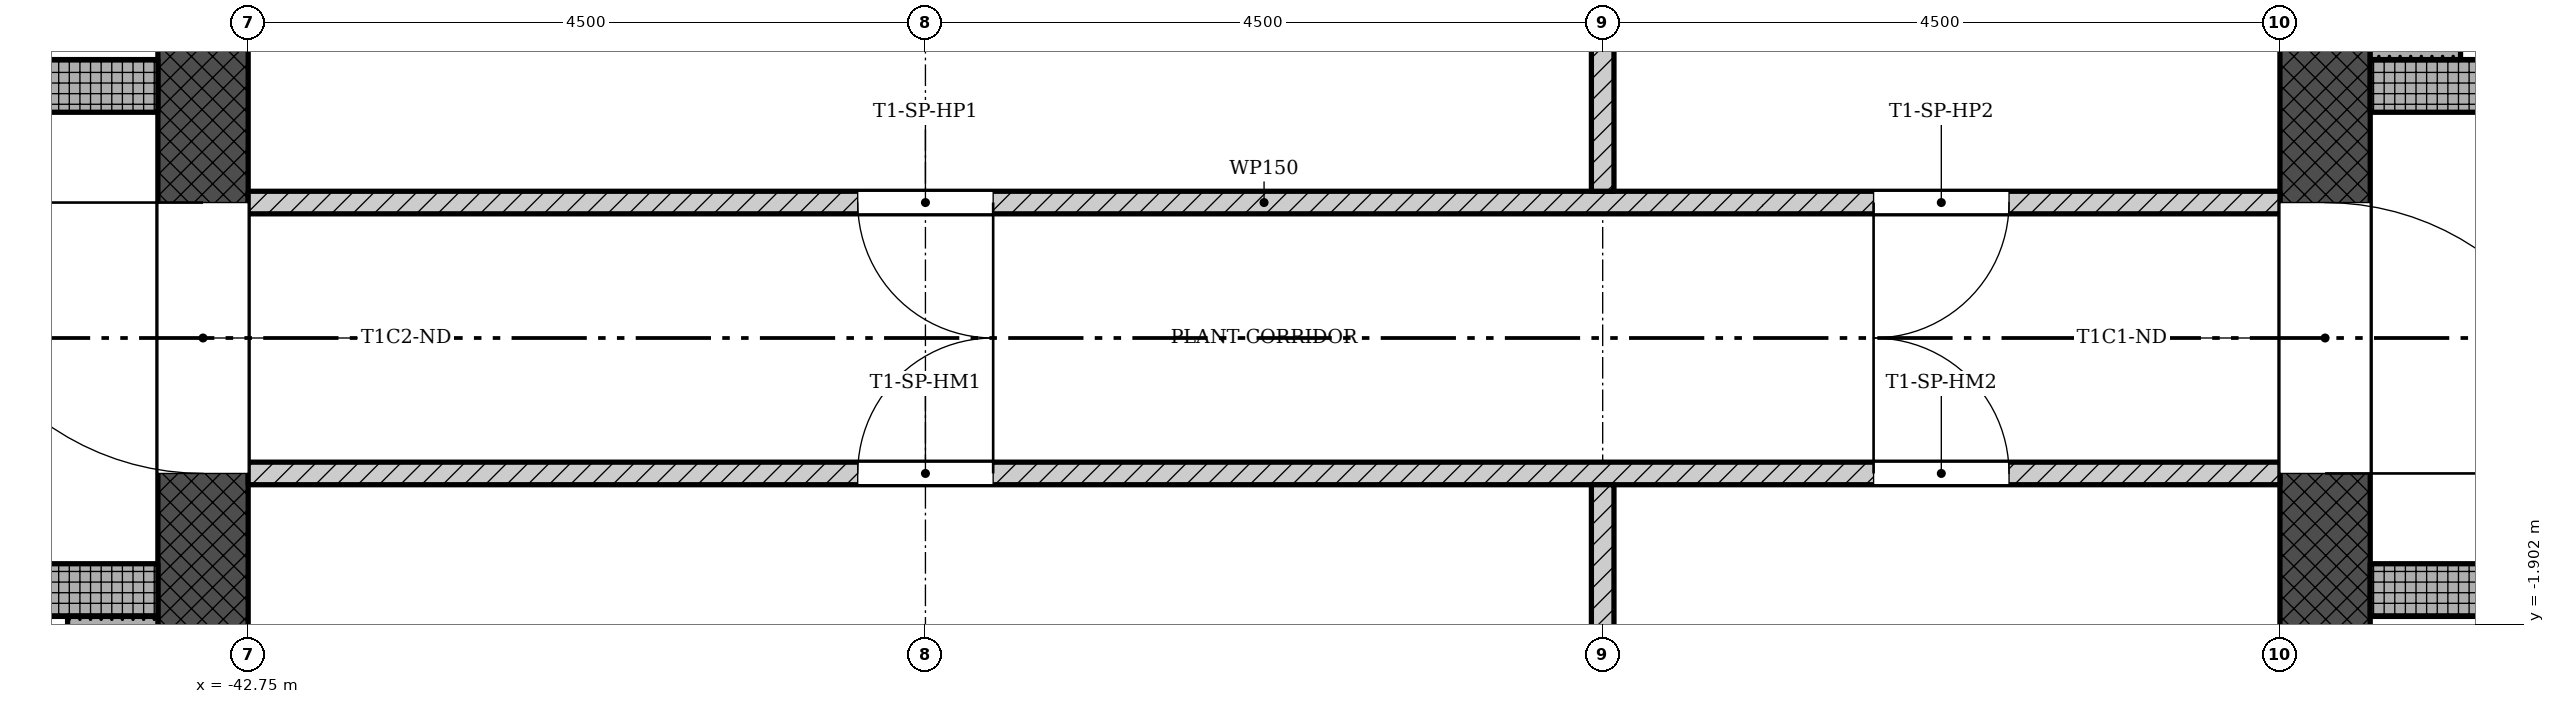
"""IFC4 building model, lengths in metres.
Left out: names, types, materials, properties, quantities, classifications, styles, units other than length and angle.
Written with IfcOpenShell. Run it as: python <this file> out.ifc"""

import sys

from ifc_helpers import new_model, si_unit, direction, frame, frame_2d, origin, place, context, subcontext, project, spatial, rectangle, extrude, element, fill, save


model = new_model("IFC4")
c1 = context("Model", 3, precision=1e-05, world=origin(), true_north=direction((0.0, 1.0)))
c2 = subcontext(c1, "Body", "Model", "MODEL_VIEW")
j1 = project(units=[si_unit("LENGTHUNIT", "METRE"), si_unit("PLANEANGLEUNIT", "RADIAN")], contexts=[c1])
p1 = place(None, origin())
s1 = spatial("IfcSite", under=j1, at=p1, CompositionType="ELEMENT")
p2 = place(p1, origin())
s2 = spatial("IfcBuilding", under=s1, at=p2, CompositionType="ELEMENT")
p3 = place(p2, frame((0.0, 0.0, 251.4)))
s3 = spatial("IfcBuildingStorey", under=s2, at=p3, CompositionType="ELEMENT", Elevation=251.4)
p4 = place(p3, frame((-28.95, 6.15, 0.0), z_axis=(0.0, 0.0, 1.0), x_axis=(0.0, -1.0, 0.0)))
e1 = element("IfcWall", 1, at=p4, inside=s3, PredefinedType="SHEAR", context=c2, shape_type="SweptSolid", body=[
    extrude(rectangle(XDim=12.9, YDim=0.6, at=frame_2d((6.45, 0.0))), origin(), (0.0, 0.0, 1.0), 4.5),
])
p5 = place(p4, frame((5.25, 0.0, 0.0)))
e2 = element("IfcOpeningElement", 2, at=p5, cuts=e1, PredefinedType="OPENING", context=c2, shape_type="SweptSolid", body=[
    extrude(rectangle(XDim=1.8, YDim=2.1, at=frame_2d((0.9, 1.05))), frame((0.0, 0.31, 0.0), z_axis=(0.0, -1.0, 0.0), x_axis=(1.0, 0.0, 0.0)), (0.0, 0.0, 1.0), 0.62),
])
p6 = place(p3, frame((-28.65, -1.675, 0.0), z_axis=(0.0, 0.0, 1.0), x_axis=(1.0, 0.0, 0.0)))
e3 = element("IfcWall", 3, at=p6, inside=s3, PredefinedType="SHEAR", context=c2, shape_type="SweptSolid", body=[
    extrude(rectangle(XDim=7.8, YDim=0.35, at=frame_2d((3.9, 0.0))), origin(), (0.0, 0.0, 1.0), 4.5),
])
p7 = place(p3, frame((-28.65, 1.675, 0.0), z_axis=(0.0, 0.0, 1.0), x_axis=(1.0, 0.0, 0.0)))
e4 = element("IfcWall", 4, at=p7, inside=s3, PredefinedType="SHEAR", context=c2, shape_type="SweptSolid", body=[
    extrude(rectangle(XDim=7.8, YDim=0.35, at=frame_2d((3.9, 0.0))), origin(), (0.0, 0.0, 1.0), 4.5),
])
p8 = place(p7, frame((1.05, 0.0, 0.0)))
e5 = element("IfcOpeningElement", 5, at=p8, cuts=e4, PredefinedType="OPENING", context=c2, shape_type="SweptSolid", body=[
    extrude(rectangle(XDim=0.9, YDim=2.1, at=frame_2d((0.45, 1.05))), frame((0.0, 0.185, 0.0), z_axis=(0.0, -1.0, 0.0), x_axis=(1.0, 0.0, 0.0)), (0.0, 0.0, 1.0), 0.37),
])
p9 = place(p3, frame((-43.05, -6.15, 0.0), z_axis=(0.0, 0.0, 1.0), x_axis=(0.0, 1.0, 0.0)))
e6 = element("IfcWall", 6, at=p9, inside=s3, PredefinedType="SHEAR", context=c2, shape_type="SweptSolid", body=[
    extrude(rectangle(XDim=12.9, YDim=0.6, at=frame_2d((6.45, 0.0))), origin(), (0.0, 0.0, 1.0), 4.5),
])
p10 = place(p9, frame((5.25, 0.0, 0.0)))
e7 = element("IfcOpeningElement", 7, at=p10, cuts=e6, PredefinedType="OPENING", context=c2, shape_type="SweptSolid", body=[
    extrude(rectangle(XDim=1.8, YDim=2.1, at=frame_2d((0.9, 1.05))), frame((0.0, 0.31, 0.0), z_axis=(0.0, -1.0, 0.0), x_axis=(1.0, 0.0, 0.0)), (0.0, 0.0, 1.0), 0.62),
])
p11 = place(p3, frame((-51.15, -1.675, 0.0), z_axis=(0.0, 0.0, 1.0), x_axis=(1.0, 0.0, 0.0)))
e8 = element("IfcWall", 8, at=p11, inside=s3, PredefinedType="SHEAR", context=c2, shape_type="SweptSolid", body=[
    extrude(rectangle(XDim=7.8, YDim=0.35, at=frame_2d((3.9, 0.0))), origin(), (0.0, 0.0, 1.0), 4.5),
])
p12 = place(p11, frame((5.85, 0.0, 0.0)))
e9 = element("IfcOpeningElement", 9, at=p12, cuts=e8, PredefinedType="OPENING", context=c2, shape_type="SweptSolid", body=[
    extrude(rectangle(XDim=0.9, YDim=2.1, at=frame_2d((0.45, 1.05))), frame((0.0, 0.185, 0.0), z_axis=(0.0, -1.0, 0.0), x_axis=(1.0, 0.0, 0.0)), (0.0, 0.0, 1.0), 0.37),
])
p13 = place(p3, frame((-51.15, 1.675, 0.0), z_axis=(0.0, 0.0, 1.0), x_axis=(1.0, 0.0, 0.0)))
e10 = element("IfcWall", 10, at=p13, inside=s3, PredefinedType="SHEAR", context=c2, shape_type="SweptSolid", body=[
    extrude(rectangle(XDim=7.8, YDim=0.35, at=frame_2d((3.9, 0.0))), origin(), (0.0, 0.0, 1.0), 4.5),
])
p14 = place(p13, frame((5.55, 0.0, 0.0)))
e11 = element("IfcOpeningElement", 11, at=p14, cuts=e10, PredefinedType="OPENING", context=c2, shape_type="SweptSolid", body=[
    extrude(rectangle(XDim=1.1, YDim=2.1, at=frame_2d((0.55, 1.05))), frame((0.0, 0.185, 0.0), z_axis=(0.0, -1.0, 0.0), x_axis=(1.0, 0.0, 0.0)), (0.0, 0.0, 1.0), 0.37),
])
p15 = place(p13, frame((3.5, 0.0, 0.0)))
e12 = element("IfcOpeningElement", 12, at=p15, cuts=e10, PredefinedType="OPENING", context=c2, shape_type="SweptSolid", body=[
    extrude(rectangle(XDim=0.9, YDim=2.1, at=frame_2d((0.45, 1.05))), frame((0.0, 0.185, 0.0), z_axis=(0.0, -1.0, 0.0), x_axis=(1.0, 0.0, 0.0)), (0.0, 0.0, 1.0), 0.37),
])
p16 = place(p3, frame((-42.75, 0.9, 0.0), z_axis=(0.0, 0.0, 1.0), x_axis=(1.0, 0.0, 0.0)))
e13 = element("IfcWall", 13, at=p16, inside=s3, PredefinedType="PARTITIONING", context=c2, shape_type="SweptSolid", body=[
    extrude(rectangle(XDim=13.5, YDim=0.15, at=frame_2d((6.75, 0.0))), origin(), (0.0, 0.0, 1.0), 4.1),
])
p17 = place(p16, frame((4.05, 0.0, 0.0)))
e14 = element("IfcOpeningElement", 14, at=p17, cuts=e13, PredefinedType="OPENING", context=c2, shape_type="SweptSolid", body=[
    extrude(rectangle(XDim=0.9, YDim=2.1, at=frame_2d((0.45, 1.05))), frame((0.0, 0.085, 0.0), z_axis=(0.0, -1.0, 0.0), x_axis=(1.0, 0.0, 0.0)), (0.0, 0.0, 1.0), 0.17),
])
p18 = place(p16, frame((10.8, 0.0, 0.0)))
e15 = element("IfcOpeningElement", 15, at=p18, cuts=e13, PredefinedType="OPENING", context=c2, shape_type="SweptSolid", body=[
    extrude(rectangle(XDim=0.9, YDim=2.1, at=frame_2d((0.45, 1.05))), frame((0.0, 0.085, 0.0), z_axis=(0.0, -1.0, 0.0), x_axis=(1.0, 0.0, 0.0)), (0.0, 0.0, 1.0), 0.17),
])
p19 = place(p3, frame((-33.75, 0.975, 0.0), z_axis=(0.0, 0.0, 1.0), x_axis=(0.0, 1.0, 0.0)))
e16 = element("IfcWall", 16, at=p19, inside=s3, PredefinedType="PARTITIONING", context=c2, shape_type="SweptSolid", body=[
    extrude(rectangle(XDim=5.875, YDim=0.15, at=frame_2d((2.938, 0.0))), origin(), (0.0, 0.0, 1.0), 4.1),
])
p20 = place(p3, frame((-42.75, -0.9, 0.0), z_axis=(0.0, 0.0, 1.0), x_axis=(1.0, 0.0, 0.0)))
e17 = element("IfcWall", 17, at=p20, inside=s3, PredefinedType="PARTITIONING", context=c2, shape_type="SweptSolid", body=[
    extrude(rectangle(XDim=13.5, YDim=0.15, at=frame_2d((6.75, 0.0))), origin(), (0.0, 0.0, 1.0), 4.1),
])
p21 = place(p20, frame((4.05, 0.0, 0.0)))
e18 = element("IfcOpeningElement", 18, at=p21, cuts=e17, PredefinedType="OPENING", context=c2, shape_type="SweptSolid", body=[
    extrude(rectangle(XDim=0.9, YDim=2.1, at=frame_2d((0.45, 1.05))), frame((0.0, 0.085, 0.0), z_axis=(0.0, -1.0, 0.0), x_axis=(1.0, 0.0, 0.0)), (0.0, 0.0, 1.0), 0.17),
])
p22 = place(p20, frame((10.8, 0.0, 0.0)))
e19 = element("IfcOpeningElement", 19, at=p22, cuts=e17, PredefinedType="OPENING", context=c2, shape_type="SweptSolid", body=[
    extrude(rectangle(XDim=0.9, YDim=2.1, at=frame_2d((0.45, 1.05))), frame((0.0, 0.085, 0.0), z_axis=(0.0, -1.0, 0.0), x_axis=(1.0, 0.0, 0.0)), (0.0, 0.0, 1.0), 0.17),
])
p23 = place(p3, frame((-33.75, -0.975, 0.0), z_axis=(0.0, 0.0, 1.0), x_axis=(0.0, -1.0, 0.0)))
e20 = element("IfcWall", 20, at=p23, inside=s3, PredefinedType="PARTITIONING", context=c2, shape_type="SweptSolid", body=[
    extrude(rectangle(XDim=5.875, YDim=0.15, at=frame_2d((2.938, 0.0))), origin(), (0.0, 0.0, 1.0), 4.1),
])
for number, where, z_axis, x_axis in (
    (21, (-28.35, 1.85, 0.0), (0.0, 0.0, 1.0), (0.0, 1.0, 0.0)),
    (22, (-43.65, -1.85, 0.0), (0.0, 0.0, 1.0), (0.0, -1.0, 0.0)),
):
    element("IfcWall", number, at=place(p3, frame(where, z_axis=z_axis, x_axis=x_axis)), inside=s3, PredefinedType="SHEAR", context=c2, shape_type="SweptSolid", body=[
        extrude(rectangle(XDim=4.3, YDim=0.6, at=frame_2d((2.15, 0.0))), origin(), (0.0, 0.0, 1.0), 4.5),
    ])
p24 = place(p17, origin())
e23 = element("IfcDoor", 23, at=p24, inside=s3, OperationType="SINGLE_SWING_RIGHT", PredefinedType="DOOR", context=c2, shape_type="SweptSolid", body=[
    extrude(rectangle(XDim=0.9, YDim=2.1, at=frame_2d((0.45, 1.05))), frame((0.0, 0.025, 0.0), z_axis=(0.0, -1.0, 0.0), x_axis=(1.0, 0.0, 0.0)), (0.0, 0.0, 1.0), 0.05),
])
fill(e14, e23)
p25 = place(p18, origin())
e24 = element("IfcDoor", 24, at=p25, inside=s3, OperationType="SINGLE_SWING_LEFT", PredefinedType="DOOR", context=c2, shape_type="SweptSolid", body=[
    extrude(rectangle(XDim=0.9, YDim=2.1, at=frame_2d((0.45, 1.05))), frame((0.0, 0.025, 0.0), z_axis=(0.0, -1.0, 0.0), x_axis=(1.0, 0.0, 0.0)), (0.0, 0.0, 1.0), 0.05),
])
fill(e15, e24)
p26 = place(p21, origin())
e25 = element("IfcDoor", 25, at=p26, inside=s3, OperationType="SINGLE_SWING_LEFT", PredefinedType="DOOR", context=c2, shape_type="SweptSolid", body=[
    extrude(rectangle(XDim=0.9, YDim=2.1, at=frame_2d((0.45, 1.05))), frame((0.0, 0.025, 0.0), z_axis=(0.0, -1.0, 0.0), x_axis=(1.0, 0.0, 0.0)), (0.0, 0.0, 1.0), 0.05),
])
fill(e18, e25)
p27 = place(p22, origin())
e26 = element("IfcDoor", 26, at=p27, inside=s3, OperationType="SINGLE_SWING_RIGHT", PredefinedType="DOOR", context=c2, shape_type="SweptSolid", body=[
    extrude(rectangle(XDim=0.9, YDim=2.1, at=frame_2d((0.45, 1.05))), frame((0.0, 0.025, 0.0), z_axis=(0.0, -1.0, 0.0), x_axis=(1.0, 0.0, 0.0)), (0.0, 0.0, 1.0), 0.05),
])
fill(e19, e26)
p28 = place(p5, origin())
e27 = element("IfcDoor", 27, at=p28, inside=s3, OperationType="SINGLE_SWING_LEFT", PredefinedType="DOOR", context=c2, shape_type="SweptSolid", body=[
    extrude(rectangle(XDim=1.8, YDim=2.1, at=frame_2d((0.9, 1.05))), frame((0.0, 0.025, 0.0), z_axis=(0.0, -1.0, 0.0), x_axis=(1.0, 0.0, 0.0)), (0.0, 0.0, 1.0), 0.05),
])
fill(e2, e27)
p29 = place(p10, origin())
e28 = element("IfcDoor", 28, at=p29, inside=s3, OperationType="SINGLE_SWING_LEFT", PredefinedType="DOOR", context=c2, shape_type="SweptSolid", body=[
    extrude(rectangle(XDim=1.8, YDim=2.1, at=frame_2d((0.9, 1.05))), frame((0.0, 0.025, 0.0), z_axis=(0.0, -1.0, 0.0), x_axis=(1.0, 0.0, 0.0)), (0.0, 0.0, 1.0), 0.05),
])
fill(e7, e28)
save(model, sys.argv[1])
